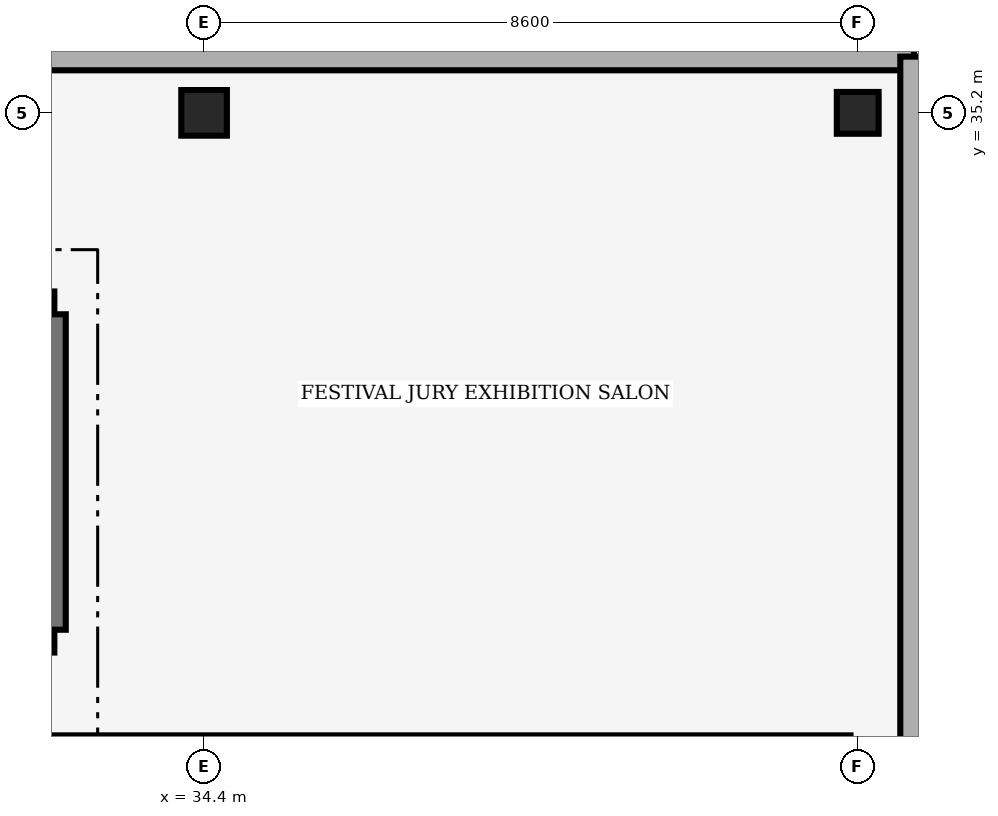
"""IFC4 building model, lengths in metres.
Left out: names, types, materials, properties, quantities, classifications, styles, units other than length and angle.
Written with IfcOpenShell. Run it as: python <this file> out.ifc"""

import sys

from ifc_helpers import new_model, si_unit, direction, frame, frame_2d, origin, origin_2d, place, context, subcontext, project, spatial, rectangle, extrude, element, save


model = new_model("IFC4")
c1 = context("Model", 3, precision=1e-05, world=origin(), true_north=direction((0.0, 1.0)))
c2 = subcontext(c1, "Body", "Model", "MODEL_VIEW")
j1 = project(units=[si_unit("LENGTHUNIT", "METRE"), si_unit("PLANEANGLEUNIT", "RADIAN")], contexts=[c1])
p1 = place(None, origin())
s1 = spatial("IfcSite", under=j1, at=p1, CompositionType="ELEMENT")
p2 = place(p1, origin())
s2 = spatial("IfcBuilding", under=s1, at=p2, CompositionType="ELEMENT")
p3 = place(p2, frame((0.0, 0.0, 22.35)))
s3 = spatial("IfcBuildingStorey", under=s2, at=p3, CompositionType="ELEMENT", Elevation=22.35)
p4 = place(p3, frame((34.4, 35.2, 0.0), z_axis=(0.0, 0.0, 1.0), x_axis=(1.0, 0.0, 0.0)))
e1 = element("IfcColumn", 1, at=p4, inside=s3, PredefinedType="COLUMN", context=c2, shape_type="SweptSolid", body=[
    extrude(rectangle(XDim=0.6, YDim=0.6, at=origin_2d()), origin(), (0.0, 0.0, 1.0), 2.91),
])
p5 = place(p3, frame((43.0, 35.2, 0.0), z_axis=(0.0, 0.0, 1.0), x_axis=(1.0, 0.0, 0.0)))
e2 = element("IfcColumn", 2, at=p5, inside=s3, PredefinedType="COLUMN", context=c2, shape_type="SweptSolid", body=[
    extrude(rectangle(XDim=0.55, YDim=0.55, at=origin_2d()), origin(), (0.0, 0.0, 1.0), 2.91),
])
p6 = place(p3, frame((-0.74, 35.94, 0.0), z_axis=(0.0, 0.0, 1.0), x_axis=(1.0, 0.0, 0.0)))
e3 = element("IfcWall", 3, at=p6, inside=s3, PredefinedType="SOLIDWALL", context=c2, shape_type="SweptSolid", body=[
    extrude(rectangle(XDim=44.48, YDim=0.36, at=frame_2d((22.24, 0.0))), origin(), (0.0, 0.0, 1.0), 2.91),
])
p7 = place(p6, frame((9.05, 0.0, 0.36)))
e4 = element("IfcOpeningElement", 4, at=p7, cuts=e3, PredefinedType="OPENING", context=c2, shape_type="SweptSolid", body=[
    extrude(rectangle(XDim=0.28, YDim=0.28, at=frame_2d((0.14, 0.14))), frame((0.0, 0.18, 0.0), z_axis=(0.0, -1.0, 0.0), x_axis=(1.0, 0.0, 0.0)), (0.0, 0.0, 1.0), 0.36),
])
p8 = place(p6, frame((9.95, 0.0, 1.26)))
e5 = element("IfcOpeningElement", 5, at=p8, cuts=e3, PredefinedType="OPENING", context=c2, shape_type="SweptSolid", body=[
    extrude(rectangle(XDim=0.28, YDim=0.28, at=frame_2d((0.14, 0.14))), frame((0.0, 0.18, 0.0), z_axis=(0.0, -1.0, 0.0), x_axis=(1.0, 0.0, 0.0)), (0.0, 0.0, 1.0), 0.36),
])
p9 = place(p6, frame((10.85, 0.0, 1.26)))
e6 = element("IfcOpeningElement", 6, at=p9, cuts=e3, PredefinedType="OPENING", context=c2, shape_type="SweptSolid", body=[
    extrude(rectangle(XDim=0.28, YDim=0.28, at=frame_2d((0.14, 0.14))), frame((0.0, 0.18, 0.0), z_axis=(0.0, -1.0, 0.0), x_axis=(1.0, 0.0, 0.0)), (0.0, 0.0, 1.0), 0.36),
])
p10 = place(p6, frame((13.53, 0.0, 1.26)))
e7 = element("IfcOpeningElement", 7, at=p10, cuts=e3, PredefinedType="OPENING", context=c2, shape_type="SweptSolid", body=[
    extrude(rectangle(XDim=0.32, YDim=0.32, at=frame_2d((0.16, 0.16))), frame((0.0, 0.18, 0.0), z_axis=(0.0, -1.0, 0.0), x_axis=(1.0, 0.0, 0.0)), (0.0, 0.0, 1.0), 0.36),
])
p11 = place(p6, frame((14.44, 0.0, 2.16)))
e8 = element("IfcOpeningElement", 8, at=p11, cuts=e3, PredefinedType="OPENING", context=c2, shape_type="SweptSolid", body=[
    extrude(rectangle(XDim=0.3, YDim=0.3, at=frame_2d((0.15, 0.15))), frame((0.0, 0.18, 0.0), z_axis=(0.0, -1.0, 0.0), x_axis=(1.0, 0.0, 0.0)), (0.0, 0.0, 1.0), 0.36),
])
p12 = place(p6, frame((15.34, 0.0, 2.16)))
e9 = element("IfcOpeningElement", 9, at=p12, cuts=e3, PredefinedType="OPENING", context=c2, shape_type="SweptSolid", body=[
    extrude(rectangle(XDim=0.3, YDim=0.3, at=frame_2d((0.15, 0.15))), frame((0.0, 0.18, 0.0), z_axis=(0.0, -1.0, 0.0), x_axis=(1.0, 0.0, 0.0)), (0.0, 0.0, 1.0), 0.36),
])
p13 = place(p6, frame((16.21, 0.0, 0.36)))
e10 = element("IfcOpeningElement", 10, at=p13, cuts=e3, PredefinedType="OPENING", context=c2, shape_type="SweptSolid", body=[
    extrude(rectangle(XDim=0.36, YDim=0.36, at=frame_2d((0.18, 0.18))), frame((0.0, 0.18, 0.0), z_axis=(0.0, -1.0, 0.0), x_axis=(1.0, 0.0, 0.0)), (0.0, 0.0, 1.0), 0.36),
])
p14 = place(p6, frame((17.11, 0.0, 0.36)))
e11 = element("IfcOpeningElement", 11, at=p14, cuts=e3, PredefinedType="OPENING", context=c2, shape_type="SweptSolid", body=[
    extrude(rectangle(XDim=0.36, YDim=0.36, at=frame_2d((0.18, 0.18))), frame((0.0, 0.18, 0.0), z_axis=(0.0, -1.0, 0.0), x_axis=(1.0, 0.0, 0.0)), (0.0, 0.0, 1.0), 0.36),
])
p15 = place(p6, frame((18.03, 0.0, 2.16)))
e12 = element("IfcOpeningElement", 12, at=p15, cuts=e3, PredefinedType="OPENING", context=c2, shape_type="SweptSolid", body=[
    extrude(rectangle(XDim=0.32, YDim=0.32, at=frame_2d((0.16, 0.16))), frame((0.0, 0.18, 0.0), z_axis=(0.0, -1.0, 0.0), x_axis=(1.0, 0.0, 0.0)), (0.0, 0.0, 1.0), 0.36),
])
p16 = place(p6, frame((18.9, 0.0, 0.36)))
e13 = element("IfcOpeningElement", 13, at=p16, cuts=e3, PredefinedType="OPENING", context=c2, shape_type="SweptSolid", body=[
    extrude(rectangle(XDim=0.38, YDim=0.38, at=frame_2d((0.19, 0.19))), frame((0.0, 0.18, 0.0), z_axis=(0.0, -1.0, 0.0), x_axis=(1.0, 0.0, 0.0)), (0.0, 0.0, 1.0), 0.36),
])
p17 = place(p6, frame((18.92, 0.0, 1.26)))
e14 = element("IfcOpeningElement", 14, at=p17, cuts=e3, PredefinedType="OPENING", context=c2, shape_type="SweptSolid", body=[
    extrude(rectangle(XDim=0.34, YDim=0.34, at=frame_2d((0.17, 0.17))), frame((0.0, 0.18, 0.0), z_axis=(0.0, -1.0, 0.0), x_axis=(1.0, 0.0, 0.0)), (0.0, 0.0, 1.0), 0.36),
])
p18 = place(p6, frame((19.8, 0.0, 0.36)))
e15 = element("IfcOpeningElement", 15, at=p18, cuts=e3, PredefinedType="OPENING", context=c2, shape_type="SweptSolid", body=[
    extrude(rectangle(XDim=0.38, YDim=0.38, at=frame_2d((0.19, 0.19))), frame((0.0, 0.18, 0.0), z_axis=(0.0, -1.0, 0.0), x_axis=(1.0, 0.0, 0.0)), (0.0, 0.0, 1.0), 0.36),
])
p19 = place(p6, frame((20.71, 0.0, 1.26)))
e16 = element("IfcOpeningElement", 16, at=p19, cuts=e3, PredefinedType="OPENING", context=c2, shape_type="SweptSolid", body=[
    extrude(rectangle(XDim=0.36, YDim=0.36, at=frame_2d((0.18, 0.18))), frame((0.0, 0.18, 0.0), z_axis=(0.0, -1.0, 0.0), x_axis=(1.0, 0.0, 0.0)), (0.0, 0.0, 1.0), 0.36),
])
p20 = place(p6, frame((21.6, 0.0, 0.36)))
e17 = element("IfcOpeningElement", 17, at=p20, cuts=e3, PredefinedType="OPENING", context=c2, shape_type="SweptSolid", body=[
    extrude(rectangle(XDim=0.38, YDim=0.38, at=frame_2d((0.19, 0.19))), frame((0.0, 0.18, 0.0), z_axis=(0.0, -1.0, 0.0), x_axis=(1.0, 0.0, 0.0)), (0.0, 0.0, 1.0), 0.36),
])
p21 = place(p6, frame((21.61, 0.0, 1.26)))
e18 = element("IfcOpeningElement", 18, at=p21, cuts=e3, PredefinedType="OPENING", context=c2, shape_type="SweptSolid", body=[
    extrude(rectangle(XDim=0.36, YDim=0.36, at=frame_2d((0.18, 0.18))), frame((0.0, 0.18, 0.0), z_axis=(0.0, -1.0, 0.0), x_axis=(1.0, 0.0, 0.0)), (0.0, 0.0, 1.0), 0.36),
])
p22 = place(p6, frame((22.5, 0.0, 0.36)))
e19 = element("IfcOpeningElement", 19, at=p22, cuts=e3, PredefinedType="OPENING", context=c2, shape_type="SweptSolid", body=[
    extrude(rectangle(XDim=0.38, YDim=0.38, at=frame_2d((0.19, 0.19))), frame((0.0, 0.18, 0.0), z_axis=(0.0, -1.0, 0.0), x_axis=(1.0, 0.0, 0.0)), (0.0, 0.0, 1.0), 0.36),
])
p23 = place(p6, frame((23.41, 0.0, 1.26)))
e20 = element("IfcOpeningElement", 20, at=p23, cuts=e3, PredefinedType="OPENING", context=c2, shape_type="SweptSolid", body=[
    extrude(rectangle(XDim=0.36, YDim=0.36, at=frame_2d((0.18, 0.18))), frame((0.0, 0.18, 0.0), z_axis=(0.0, -1.0, 0.0), x_axis=(1.0, 0.0, 0.0)), (0.0, 0.0, 1.0), 0.36),
])
p24 = place(p6, frame((24.3, 0.0, 0.36)))
e21 = element("IfcOpeningElement", 21, at=p24, cuts=e3, PredefinedType="OPENING", context=c2, shape_type="SweptSolid", body=[
    extrude(rectangle(XDim=0.38, YDim=0.38, at=frame_2d((0.19, 0.19))), frame((0.0, 0.18, 0.0), z_axis=(0.0, -1.0, 0.0), x_axis=(1.0, 0.0, 0.0)), (0.0, 0.0, 1.0), 0.36),
])
p25 = place(p6, frame((24.32, 0.0, 1.26)))
e22 = element("IfcOpeningElement", 22, at=p25, cuts=e3, PredefinedType="OPENING", context=c2, shape_type="SweptSolid", body=[
    extrude(rectangle(XDim=0.34, YDim=0.34, at=frame_2d((0.17, 0.17))), frame((0.0, 0.18, 0.0), z_axis=(0.0, -1.0, 0.0), x_axis=(1.0, 0.0, 0.0)), (0.0, 0.0, 1.0), 0.36),
])
p26 = place(p6, frame((25.2, 0.0, 0.36)))
e23 = element("IfcOpeningElement", 23, at=p26, cuts=e3, PredefinedType="OPENING", context=c2, shape_type="SweptSolid", body=[
    extrude(rectangle(XDim=0.38, YDim=0.38, at=frame_2d((0.19, 0.19))), frame((0.0, 0.18, 0.0), z_axis=(0.0, -1.0, 0.0), x_axis=(1.0, 0.0, 0.0)), (0.0, 0.0, 1.0), 0.36),
])
p27 = place(p6, frame((25.23, 0.0, 2.16)))
e24 = element("IfcOpeningElement", 24, at=p27, cuts=e3, PredefinedType="OPENING", context=c2, shape_type="SweptSolid", body=[
    extrude(rectangle(XDim=0.32, YDim=0.32, at=frame_2d((0.16, 0.16))), frame((0.0, 0.18, 0.0), z_axis=(0.0, -1.0, 0.0), x_axis=(1.0, 0.0, 0.0)), (0.0, 0.0, 1.0), 0.36),
])
p28 = place(p6, frame((26.13, 0.0, 2.16)))
e25 = element("IfcOpeningElement", 25, at=p28, cuts=e3, PredefinedType="OPENING", context=c2, shape_type="SweptSolid", body=[
    extrude(rectangle(XDim=0.32, YDim=0.32, at=frame_2d((0.16, 0.16))), frame((0.0, 0.18, 0.0), z_axis=(0.0, -1.0, 0.0), x_axis=(1.0, 0.0, 0.0)), (0.0, 0.0, 1.0), 0.36),
])
p29 = place(p6, frame((27.01, 0.0, 0.36)))
e26 = element("IfcOpeningElement", 26, at=p29, cuts=e3, PredefinedType="OPENING", context=c2, shape_type="SweptSolid", body=[
    extrude(rectangle(XDim=0.36, YDim=0.36, at=frame_2d((0.18, 0.18))), frame((0.0, 0.18, 0.0), z_axis=(0.0, -1.0, 0.0), x_axis=(1.0, 0.0, 0.0)), (0.0, 0.0, 1.0), 0.36),
])
p30 = place(p6, frame((27.91, 0.0, 0.36)))
e27 = element("IfcOpeningElement", 27, at=p30, cuts=e3, PredefinedType="OPENING", context=c2, shape_type="SweptSolid", body=[
    extrude(rectangle(XDim=0.36, YDim=0.36, at=frame_2d((0.18, 0.18))), frame((0.0, 0.18, 0.0), z_axis=(0.0, -1.0, 0.0), x_axis=(1.0, 0.0, 0.0)), (0.0, 0.0, 1.0), 0.36),
])
p31 = place(p6, frame((28.84, 0.0, 2.16)))
e28 = element("IfcOpeningElement", 28, at=p31, cuts=e3, PredefinedType="OPENING", context=c2, shape_type="SweptSolid", body=[
    extrude(rectangle(XDim=0.3, YDim=0.3, at=frame_2d((0.15, 0.15))), frame((0.0, 0.18, 0.0), z_axis=(0.0, -1.0, 0.0), x_axis=(1.0, 0.0, 0.0)), (0.0, 0.0, 1.0), 0.36),
])
p32 = place(p6, frame((30.62, 0.0, 0.36)))
e29 = element("IfcOpeningElement", 29, at=p32, cuts=e3, PredefinedType="OPENING", context=c2, shape_type="SweptSolid", body=[
    extrude(rectangle(XDim=0.34, YDim=0.34, at=frame_2d((0.17, 0.17))), frame((0.0, 0.18, 0.0), z_axis=(0.0, -1.0, 0.0), x_axis=(1.0, 0.0, 0.0)), (0.0, 0.0, 1.0), 0.36),
])
p33 = place(p6, frame((31.54, 0.0, 1.26)))
e30 = element("IfcOpeningElement", 30, at=p33, cuts=e3, PredefinedType="OPENING", context=c2, shape_type="SweptSolid", body=[
    extrude(rectangle(XDim=0.3, YDim=0.3, at=frame_2d((0.15, 0.15))), frame((0.0, 0.18, 0.0), z_axis=(0.0, -1.0, 0.0), x_axis=(1.0, 0.0, 0.0)), (0.0, 0.0, 1.0), 0.36),
])
p34 = place(p6, frame((32.44, 0.0, 1.26)))
e31 = element("IfcOpeningElement", 31, at=p34, cuts=e3, PredefinedType="OPENING", context=c2, shape_type="SweptSolid", body=[
    extrude(rectangle(XDim=0.3, YDim=0.3, at=frame_2d((0.15, 0.15))), frame((0.0, 0.18, 0.0), z_axis=(0.0, -1.0, 0.0), x_axis=(1.0, 0.0, 0.0)), (0.0, 0.0, 1.0), 0.36),
])
p35 = place(p3, frame((43.74, 35.94, 0.0), z_axis=(0.0, 0.0, 1.0), x_axis=(0.0, -1.0, 0.0)))
e32 = element("IfcWall", 32, at=p35, inside=s3, PredefinedType="SOLIDWALL", context=c2, shape_type="SweptSolid", body=[
    extrude(rectangle(XDim=36.68, YDim=0.36, at=frame_2d((18.34, 0.0))), origin(), (0.0, 0.0, 1.0), 2.91),
])
p36 = place(p35, frame((9.18, 0.0, 0.36)))
e33 = element("IfcOpeningElement", 33, at=p36, cuts=e32, PredefinedType="OPENING", context=c2, shape_type="SweptSolid", body=[
    extrude(rectangle(XDim=0.32, YDim=0.32, at=frame_2d((0.16, 0.16))), frame((0.0, 0.18, 0.0), z_axis=(0.0, -1.0, 0.0), x_axis=(1.0, 0.0, 0.0)), (0.0, 0.0, 1.0), 0.36),
])
p37 = place(p35, frame((10.09, 0.0, 1.26)))
e34 = element("IfcOpeningElement", 34, at=p37, cuts=e32, PredefinedType="OPENING", context=c2, shape_type="SweptSolid", body=[
    extrude(rectangle(XDim=0.3, YDim=0.3, at=frame_2d((0.15, 0.15))), frame((0.0, 0.18, 0.0), z_axis=(0.0, -1.0, 0.0), x_axis=(1.0, 0.0, 0.0)), (0.0, 0.0, 1.0), 0.36),
])
p38 = place(p35, frame((10.98, 0.0, 1.26)))
e35 = element("IfcOpeningElement", 35, at=p38, cuts=e32, PredefinedType="OPENING", context=c2, shape_type="SweptSolid", body=[
    extrude(rectangle(XDim=0.32, YDim=0.32, at=frame_2d((0.16, 0.16))), frame((0.0, 0.18, 0.0), z_axis=(0.0, -1.0, 0.0), x_axis=(1.0, 0.0, 0.0)), (0.0, 0.0, 1.0), 0.36),
])
p39 = place(p35, frame((13.66, 0.0, 0.36)))
e36 = element("IfcOpeningElement", 36, at=p39, cuts=e32, PredefinedType="OPENING", context=c2, shape_type="SweptSolid", body=[
    extrude(rectangle(XDim=0.36, YDim=0.36, at=frame_2d((0.18, 0.18))), frame((0.0, 0.18, 0.0), z_axis=(0.0, -1.0, 0.0), x_axis=(1.0, 0.0, 0.0)), (0.0, 0.0, 1.0), 0.36),
])
p40 = place(p35, frame((13.67, 0.0, 1.26)))
e37 = element("IfcOpeningElement", 37, at=p40, cuts=e32, PredefinedType="OPENING", context=c2, shape_type="SweptSolid", body=[
    extrude(rectangle(XDim=0.34, YDim=0.34, at=frame_2d((0.17, 0.17))), frame((0.0, 0.18, 0.0), z_axis=(0.0, -1.0, 0.0), x_axis=(1.0, 0.0, 0.0)), (0.0, 0.0, 1.0), 0.36),
])
p41 = place(p35, frame((14.56, 0.0, 0.36)))
e38 = element("IfcOpeningElement", 38, at=p41, cuts=e32, PredefinedType="OPENING", context=c2, shape_type="SweptSolid", body=[
    extrude(rectangle(XDim=0.36, YDim=0.36, at=frame_2d((0.18, 0.18))), frame((0.0, 0.18, 0.0), z_axis=(0.0, -1.0, 0.0), x_axis=(1.0, 0.0, 0.0)), (0.0, 0.0, 1.0), 0.36),
])
p42 = place(p35, frame((14.58, 0.0, 2.16)))
e39 = element("IfcOpeningElement", 39, at=p42, cuts=e32, PredefinedType="OPENING", context=c2, shape_type="SweptSolid", body=[
    extrude(rectangle(XDim=0.32, YDim=0.32, at=frame_2d((0.16, 0.16))), frame((0.0, 0.18, 0.0), z_axis=(0.0, -1.0, 0.0), x_axis=(1.0, 0.0, 0.0)), (0.0, 0.0, 1.0), 0.36),
])
p43 = place(p35, frame((15.47, 0.0, 1.26)))
e40 = element("IfcOpeningElement", 40, at=p43, cuts=e32, PredefinedType="OPENING", context=c2, shape_type="SweptSolid", body=[
    extrude(rectangle(XDim=0.34, YDim=0.34, at=frame_2d((0.17, 0.17))), frame((0.0, 0.18, 0.0), z_axis=(0.0, -1.0, 0.0), x_axis=(1.0, 0.0, 0.0)), (0.0, 0.0, 1.0), 0.36),
])
p44 = place(p35, frame((15.48, 0.0, 2.16)))
e41 = element("IfcOpeningElement", 41, at=p44, cuts=e32, PredefinedType="OPENING", context=c2, shape_type="SweptSolid", body=[
    extrude(rectangle(XDim=0.32, YDim=0.32, at=frame_2d((0.16, 0.16))), frame((0.0, 0.18, 0.0), z_axis=(0.0, -1.0, 0.0), x_axis=(1.0, 0.0, 0.0)), (0.0, 0.0, 1.0), 0.36),
])
p45 = place(p35, frame((16.35, 0.0, 0.36)))
e42 = element("IfcOpeningElement", 42, at=p45, cuts=e32, PredefinedType="OPENING", context=c2, shape_type="SweptSolid", body=[
    extrude(rectangle(XDim=0.38, YDim=0.38, at=frame_2d((0.19, 0.19))), frame((0.0, 0.18, 0.0), z_axis=(0.0, -1.0, 0.0), x_axis=(1.0, 0.0, 0.0)), (0.0, 0.0, 1.0), 0.36),
])
p46 = place(p35, frame((16.36, 0.0, 1.26)))
e43 = element("IfcOpeningElement", 43, at=p46, cuts=e32, PredefinedType="OPENING", context=c2, shape_type="SweptSolid", body=[
    extrude(rectangle(XDim=0.36, YDim=0.36, at=frame_2d((0.18, 0.18))), frame((0.0, 0.18, 0.0), z_axis=(0.0, -1.0, 0.0), x_axis=(1.0, 0.0, 0.0)), (0.0, 0.0, 1.0), 0.36),
])
p47 = place(p35, frame((17.25, 0.0, 0.36)))
e44 = element("IfcOpeningElement", 44, at=p47, cuts=e32, PredefinedType="OPENING", context=c2, shape_type="SweptSolid", body=[
    extrude(rectangle(XDim=0.38, YDim=0.38, at=frame_2d((0.19, 0.19))), frame((0.0, 0.18, 0.0), z_axis=(0.0, -1.0, 0.0), x_axis=(1.0, 0.0, 0.0)), (0.0, 0.0, 1.0), 0.36),
])
p48 = place(p35, frame((18.16, 0.0, 1.26)))
e45 = element("IfcOpeningElement", 45, at=p48, cuts=e32, PredefinedType="OPENING", context=c2, shape_type="SweptSolid", body=[
    extrude(rectangle(XDim=0.36, YDim=0.36, at=frame_2d((0.18, 0.18))), frame((0.0, 0.18, 0.0), z_axis=(0.0, -1.0, 0.0), x_axis=(1.0, 0.0, 0.0)), (0.0, 0.0, 1.0), 0.36),
])
p49 = place(p35, frame((18.18, 0.0, 2.16)))
e46 = element("IfcOpeningElement", 46, at=p49, cuts=e32, PredefinedType="OPENING", context=c2, shape_type="SweptSolid", body=[
    extrude(rectangle(XDim=0.32, YDim=0.32, at=frame_2d((0.16, 0.16))), frame((0.0, 0.18, 0.0), z_axis=(0.0, -1.0, 0.0), x_axis=(1.0, 0.0, 0.0)), (0.0, 0.0, 1.0), 0.36),
])
p50 = place(p35, frame((19.05, 0.0, 0.36)))
e47 = element("IfcOpeningElement", 47, at=p50, cuts=e32, PredefinedType="OPENING", context=c2, shape_type="SweptSolid", body=[
    extrude(rectangle(XDim=0.38, YDim=0.38, at=frame_2d((0.19, 0.19))), frame((0.0, 0.18, 0.0), z_axis=(0.0, -1.0, 0.0), x_axis=(1.0, 0.0, 0.0)), (0.0, 0.0, 1.0), 0.36),
])
p51 = place(p35, frame((19.06, 0.0, 1.26)))
e48 = element("IfcOpeningElement", 48, at=p51, cuts=e32, PredefinedType="OPENING", context=c2, shape_type="SweptSolid", body=[
    extrude(rectangle(XDim=0.36, YDim=0.36, at=frame_2d((0.18, 0.18))), frame((0.0, 0.18, 0.0), z_axis=(0.0, -1.0, 0.0), x_axis=(1.0, 0.0, 0.0)), (0.0, 0.0, 1.0), 0.36),
])
p52 = place(p35, frame((19.95, 0.0, 0.36)))
e49 = element("IfcOpeningElement", 49, at=p52, cuts=e32, PredefinedType="OPENING", context=c2, shape_type="SweptSolid", body=[
    extrude(rectangle(XDim=0.38, YDim=0.38, at=frame_2d((0.19, 0.19))), frame((0.0, 0.18, 0.0), z_axis=(0.0, -1.0, 0.0), x_axis=(1.0, 0.0, 0.0)), (0.0, 0.0, 1.0), 0.36),
])
p53 = place(p35, frame((20.87, 0.0, 1.26)))
e50 = element("IfcOpeningElement", 50, at=p53, cuts=e32, PredefinedType="OPENING", context=c2, shape_type="SweptSolid", body=[
    extrude(rectangle(XDim=0.34, YDim=0.34, at=frame_2d((0.17, 0.17))), frame((0.0, 0.18, 0.0), z_axis=(0.0, -1.0, 0.0), x_axis=(1.0, 0.0, 0.0)), (0.0, 0.0, 1.0), 0.36),
])
p54 = place(p35, frame((21.76, 0.0, 0.36)))
e51 = element("IfcOpeningElement", 51, at=p54, cuts=e32, PredefinedType="OPENING", context=c2, shape_type="SweptSolid", body=[
    extrude(rectangle(XDim=0.36, YDim=0.36, at=frame_2d((0.18, 0.18))), frame((0.0, 0.18, 0.0), z_axis=(0.0, -1.0, 0.0), x_axis=(1.0, 0.0, 0.0)), (0.0, 0.0, 1.0), 0.36),
])
p55 = place(p35, frame((21.77, 0.0, 1.26)))
e52 = element("IfcOpeningElement", 52, at=p55, cuts=e32, PredefinedType="OPENING", context=c2, shape_type="SweptSolid", body=[
    extrude(rectangle(XDim=0.34, YDim=0.34, at=frame_2d((0.17, 0.17))), frame((0.0, 0.18, 0.0), z_axis=(0.0, -1.0, 0.0), x_axis=(1.0, 0.0, 0.0)), (0.0, 0.0, 1.0), 0.36),
])
p56 = place(p35, frame((22.66, 0.0, 0.36)))
e53 = element("IfcOpeningElement", 53, at=p56, cuts=e32, PredefinedType="OPENING", context=c2, shape_type="SweptSolid", body=[
    extrude(rectangle(XDim=0.36, YDim=0.36, at=frame_2d((0.18, 0.18))), frame((0.0, 0.18, 0.0), z_axis=(0.0, -1.0, 0.0), x_axis=(1.0, 0.0, 0.0)), (0.0, 0.0, 1.0), 0.36),
])
p57 = place(p35, frame((24.48, 0.0, 1.26)))
e54 = element("IfcOpeningElement", 54, at=p57, cuts=e32, PredefinedType="OPENING", context=c2, shape_type="SweptSolid", body=[
    extrude(rectangle(XDim=0.32, YDim=0.32, at=frame_2d((0.16, 0.16))), frame((0.0, 0.18, 0.0), z_axis=(0.0, -1.0, 0.0), x_axis=(1.0, 0.0, 0.0)), (0.0, 0.0, 1.0), 0.36),
])
p58 = place(p35, frame((25.39, 0.0, 2.16)))
e55 = element("IfcOpeningElement", 55, at=p58, cuts=e32, PredefinedType="OPENING", context=c2, shape_type="SweptSolid", body=[
    extrude(rectangle(XDim=0.3, YDim=0.3, at=frame_2d((0.15, 0.15))), frame((0.0, 0.18, 0.0), z_axis=(0.0, -1.0, 0.0), x_axis=(1.0, 0.0, 0.0)), (0.0, 0.0, 1.0), 0.36),
])
p59 = place(p35, frame((26.3, 0.0, 2.16)))
e56 = element("IfcOpeningElement", 56, at=p59, cuts=e32, PredefinedType="OPENING", context=c2, shape_type="SweptSolid", body=[
    extrude(rectangle(XDim=0.28, YDim=0.28, at=frame_2d((0.14, 0.14))), frame((0.0, 0.18, 0.0), z_axis=(0.0, -1.0, 0.0), x_axis=(1.0, 0.0, 0.0)), (0.0, 0.0, 1.0), 0.36),
])
p60 = place(p35, frame((27.18, 0.0, 0.36)))
e57 = element("IfcOpeningElement", 57, at=p60, cuts=e32, PredefinedType="OPENING", context=c2, shape_type="SweptSolid", body=[
    extrude(rectangle(XDim=0.32, YDim=0.32, at=frame_2d((0.16, 0.16))), frame((0.0, 0.18, 0.0), z_axis=(0.0, -1.0, 0.0), x_axis=(1.0, 0.0, 0.0)), (0.0, 0.0, 1.0), 0.36),
])
p61 = place(p35, frame((28.09, 0.0, 0.36)))
e58 = element("IfcOpeningElement", 58, at=p61, cuts=e32, PredefinedType="OPENING", context=c2, shape_type="SweptSolid", body=[
    extrude(rectangle(XDim=0.3, YDim=0.3, at=frame_2d((0.15, 0.15))), frame((0.0, 0.18, 0.0), z_axis=(0.0, -1.0, 0.0), x_axis=(1.0, 0.0, 0.0)), (0.0, 0.0, 1.0), 0.36),
])
for number, where, z_axis, x_axis in (
    (59, (32.43, 28.25, 0.0), (0.0, 0.0, 1.0), (-1.0, 0.0, 0.0)),
    (60, (22.25, 32.7, 0.0), (0.0, 0.0, 1.0), (1.0, 0.0, 0.0)),
):
    element("IfcWall", number, at=place(p3, frame(where, z_axis=z_axis, x_axis=x_axis)), inside=s3, PredefinedType="SHEAR", context=c2, shape_type="SweptSolid", body=[
        extrude(rectangle(XDim=10.18, YDim=0.3, at=frame_2d((5.09, 0.0))), origin(), (0.0, 0.0, 1.0), 2.91),
    ])
p62 = place(p3, frame((32.43, 32.55, 0.0), z_axis=(0.0, 0.0, 1.0), x_axis=(0.0, -1.0, 0.0)))
e61 = element("IfcWall", 61, at=p62, inside=s3, PredefinedType="SHEAR", context=c2, shape_type="SweptSolid", body=[
    extrude(rectangle(XDim=4.15, YDim=0.3, at=frame_2d((2.075, 0.0))), origin(), (0.0, 0.0, 1.0), 2.91),
])
p63 = place(p3, frame((26.695, 26.905, 0.0), z_axis=(0.0, 0.0, 1.0), x_axis=(1.0, 0.0, 0.0)))
e62 = element("IfcWall", 62, at=p63, inside=s3, PredefinedType="PARTITIONING", context=c2, shape_type="SweptSolid", body=[
    extrude(rectangle(XDim=16.21, YDim=0.21, at=frame_2d((8.105, 0.0))), origin(), (0.0, 0.0, 1.0), 2.89),
])
save(model, sys.argv[1])
